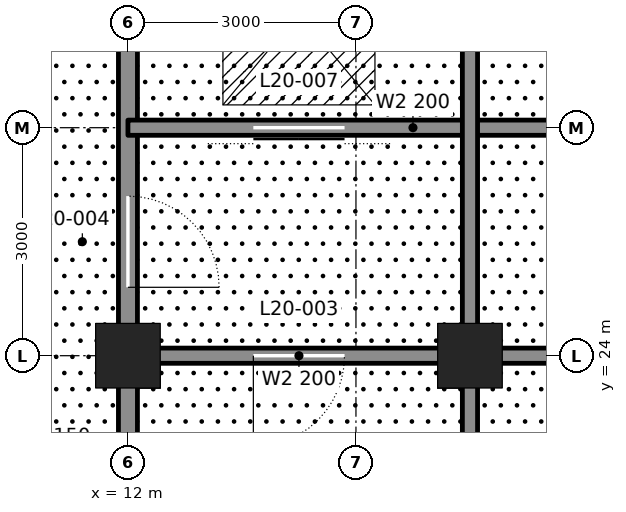
"""IFC4 building model, lengths in metres.
Left out: names, types, materials, properties, quantities, classifications, styles, units other than length and angle.
Written with IfcOpenShell. Run it as: python <this file> out.ifc"""

import sys

from ifc_helpers import new_model, si_unit, direction, frame, frame_2d, origin, origin_2d, place, context, subcontext, project, spatial, rectangle, hollow_rectangle, extrude, element, fill, save


model = new_model("IFC4")
c1 = context("Model", 3, precision=1e-05, world=origin(), true_north=direction((0.0, 1.0)))
c2 = subcontext(c1, "Body", "Model", "MODEL_VIEW")
j1 = project(units=[si_unit("LENGTHUNIT", "METRE"), si_unit("PLANEANGLEUNIT", "RADIAN")], contexts=[c1])
p1 = place(None, origin())
s1 = spatial("IfcSite", under=j1, at=p1, CompositionType="ELEMENT")
p2 = place(p1, origin())
s2 = spatial("IfcBuilding", under=s1, at=p2, CompositionType="ELEMENT")
p3 = place(p2, frame((0.0, 0.0, 96.3)))
s3 = spatial("IfcBuildingStorey", under=s2, at=p3, CompositionType="ELEMENT", Elevation=96.3)
for number, where, z_axis, x_axis in (
    (1, (12.0, 24.0, 0.0), (0.0, 0.0, 1.0), (1.0, 0.0, 0.0)),
    (2, (16.5, 24.0, 0.0), (0.0, 0.0, 1.0), (1.0, 0.0, 0.0)),
):
    element("IfcColumn", number, at=place(p3, frame(where, z_axis=z_axis, x_axis=x_axis)), inside=s3, PredefinedType="COLUMN", context=c2, shape_type="SweptSolid", body=[
        extrude(hollow_rectangle(XDim=0.85, YDim=0.85, WallThickness=0.085, at=origin_2d()), origin(), (0.0, 0.0, 1.0), 6.0),
    ])
p4 = place(p3, frame((12.0, 21.25, 0.0), z_axis=(0.0, 0.0, 1.0), x_axis=(0.0, 1.0, 0.0)))
e3 = element("IfcWall", 3, at=p4, inside=s3, PredefinedType="SOLIDWALL", context=c2, shape_type="SweptSolid", body=[
    extrude(rectangle(XDim=2.5, YDim=0.25, at=frame_2d((1.25, 0.0))), origin(), (0.0, 0.0, 1.0), 4.913),
])
p5 = place(p3, frame((12.0, 24.25, 0.0), z_axis=(0.0, 0.0, 1.0), x_axis=(0.0, 1.0, 0.0)))
e4 = element("IfcWall", 4, at=p5, inside=s3, PredefinedType="SOLIDWALL", context=c2, shape_type="SweptSolid", body=[
    extrude(rectangle(XDim=8.5, YDim=0.25, at=frame_2d((4.25, 0.0))), origin(), (0.0, 0.0, 1.0), 4.913),
])
p6 = place(p5, frame((0.65, 0.0, 0.0)))
e5 = element("IfcOpeningElement", 5, at=p6, cuts=e4, PredefinedType="OPENING", context=c2, shape_type="SweptSolid", body=[
    extrude(rectangle(XDim=1.2, YDim=2.1, at=frame_2d((0.6, 1.05))), frame((0.0, 0.135, 0.0), z_axis=(0.0, -1.0, 0.0), x_axis=(1.0, 0.0, 0.0)), (0.0, 0.0, 1.0), 0.27),
])
p7 = place(p5, frame((6.875, 0.0, 0.0)))
e6 = element("IfcOpeningElement", 6, at=p7, cuts=e4, PredefinedType="OPENING", context=c2, shape_type="SweptSolid", body=[
    extrude(rectangle(XDim=0.75, YDim=2.1, at=frame_2d((0.375, 1.05))), frame((0.0, 0.135, 0.0), z_axis=(0.0, -1.0, 0.0), x_axis=(1.0, 0.0, 0.0)), (0.0, 0.0, 1.0), 0.27),
])
p8 = place(p3, frame((12.25, 24.0, 0.0), z_axis=(0.0, 0.0, 1.0), x_axis=(1.0, 0.0, 0.0)))
e7 = element("IfcWall", 7, at=p8, inside=s3, PredefinedType="SOLIDWALL", context=c2, shape_type="SweptSolid", body=[
    extrude(rectangle(XDim=4.0, YDim=0.2, at=frame_2d((2.0, 0.0))), origin(), (0.0, 0.0, 1.0), 4.89),
])
p9 = place(p8, frame((1.4, 0.0, 0.0)))
e8 = element("IfcOpeningElement", 8, at=p9, cuts=e7, PredefinedType="OPENING", context=c2, shape_type="SweptSolid", body=[
    extrude(rectangle(XDim=1.2, YDim=2.1, at=frame_2d((0.6, 1.05))), frame((0.0, 0.11, 0.0), z_axis=(0.0, -1.0, 0.0), x_axis=(1.0, 0.0, 0.0)), (0.0, 0.0, 1.0), 0.22),
])
p10 = place(p3, frame((16.75, 24.0, 0.0), z_axis=(0.0, 0.0, 1.0), x_axis=(1.0, 0.0, 0.0)))
e9 = element("IfcWall", 9, at=p10, inside=s3, PredefinedType="SOLIDWALL", context=c2, shape_type="SweptSolid", body=[
    extrude(rectangle(XDim=2.75, YDim=0.2, at=frame_2d((1.375, 0.0))), origin(), (0.0, 0.0, 1.0), 4.89),
])
p11 = place(p3, frame((12.0, 27.0, 0.0), z_axis=(0.0, 0.0, 1.0), x_axis=(1.0, 0.0, 0.0)))
e10 = element("IfcWall", 10, at=p11, inside=s3, PredefinedType="SOLIDWALL", context=c2, shape_type="SweptSolid", body=[
    extrude(rectangle(XDim=7.5, YDim=0.2, at=frame_2d((3.75, 0.0))), origin(), (0.0, 0.0, 1.0), 5.84),
])
p12 = place(p11, frame((1.65, 0.0, 0.0)))
e11 = element("IfcOpeningElement", 11, at=p12, cuts=e10, PredefinedType="OPENING", context=c2, shape_type="SweptSolid", body=[
    extrude(rectangle(XDim=1.2, YDim=2.1, at=frame_2d((0.6, 1.05))), frame((0.0, 0.11, 0.0), z_axis=(0.0, -1.0, 0.0), x_axis=(1.0, 0.0, 0.0)), (0.0, 0.0, 1.0), 0.22),
])
p13 = place(p3, frame((16.5, 21.25, 0.0), z_axis=(0.0, 0.0, 1.0), x_axis=(0.0, 1.0, 0.0)))
e12 = element("IfcWall", 12, at=p13, inside=s3, PredefinedType="SOLIDWALL", context=c2, shape_type="SweptSolid", body=[
    extrude(rectangle(XDim=2.5, YDim=0.2, at=frame_2d((1.25, 0.0))), origin(), (0.0, 0.0, 1.0), 4.913),
])
p14 = place(p3, frame((16.5, 24.25, 0.0), z_axis=(0.0, 0.0, 1.0), x_axis=(0.0, 1.0, 0.0)))
e13 = element("IfcWall", 13, at=p14, inside=s3, PredefinedType="SOLIDWALL", context=c2, shape_type="SweptSolid", body=[
    extrude(rectangle(XDim=8.5, YDim=0.2, at=frame_2d((4.25, 0.0))), origin(), (0.0, 0.0, 1.0), 4.913),
])
p15 = place(p9, frame((1.2, 0.0, 0.0), z_axis=(0.0, 0.0, 1.0), x_axis=(-1.0, 0.0, 0.0)))
e14 = element("IfcDoor", 14, at=p15, inside=s3, OperationType="SINGLE_SWING_RIGHT", PredefinedType="DOOR", context=c2, shape_type="SweptSolid", body=[
    extrude(rectangle(XDim=1.2, YDim=2.1, at=frame_2d((0.6, 1.05))), frame((0.0, 0.025, 0.0), z_axis=(0.0, -1.0, 0.0), x_axis=(1.0, 0.0, 0.0)), (0.0, 0.0, 1.0), 0.05),
])
fill(e8, e14)
p16 = place(p6, frame((1.2, 0.0, 0.0), z_axis=(0.0, 0.0, 1.0), x_axis=(-1.0, 0.0, 0.0)))
e15 = element("IfcDoor", 15, at=p16, inside=s3, OperationType="SINGLE_SWING_RIGHT", PredefinedType="DOOR", context=c2, shape_type="SweptSolid", body=[
    extrude(rectangle(XDim=1.2, YDim=2.1, at=frame_2d((0.6, 1.05))), frame((0.0, 0.025, 0.0), z_axis=(0.0, -1.0, 0.0), x_axis=(1.0, 0.0, 0.0)), (0.0, 0.0, 1.0), 0.05),
])
fill(e5, e15)
p17 = place(p12, origin())
e16 = element("IfcDoor", 16, at=p17, inside=s3, OperationType="DOUBLE_DOOR_SLIDING", PredefinedType="DOOR", context=c2, shape_type="SweptSolid", body=[
    extrude(rectangle(XDim=1.2, YDim=2.1, at=frame_2d((0.6, 1.05))), frame((0.0, 0.025, 0.0), z_axis=(0.0, -1.0, 0.0), x_axis=(1.0, 0.0, 0.0)), (0.0, 0.0, 1.0), 0.05),
])
fill(e11, e16)
save(model, sys.argv[1])
